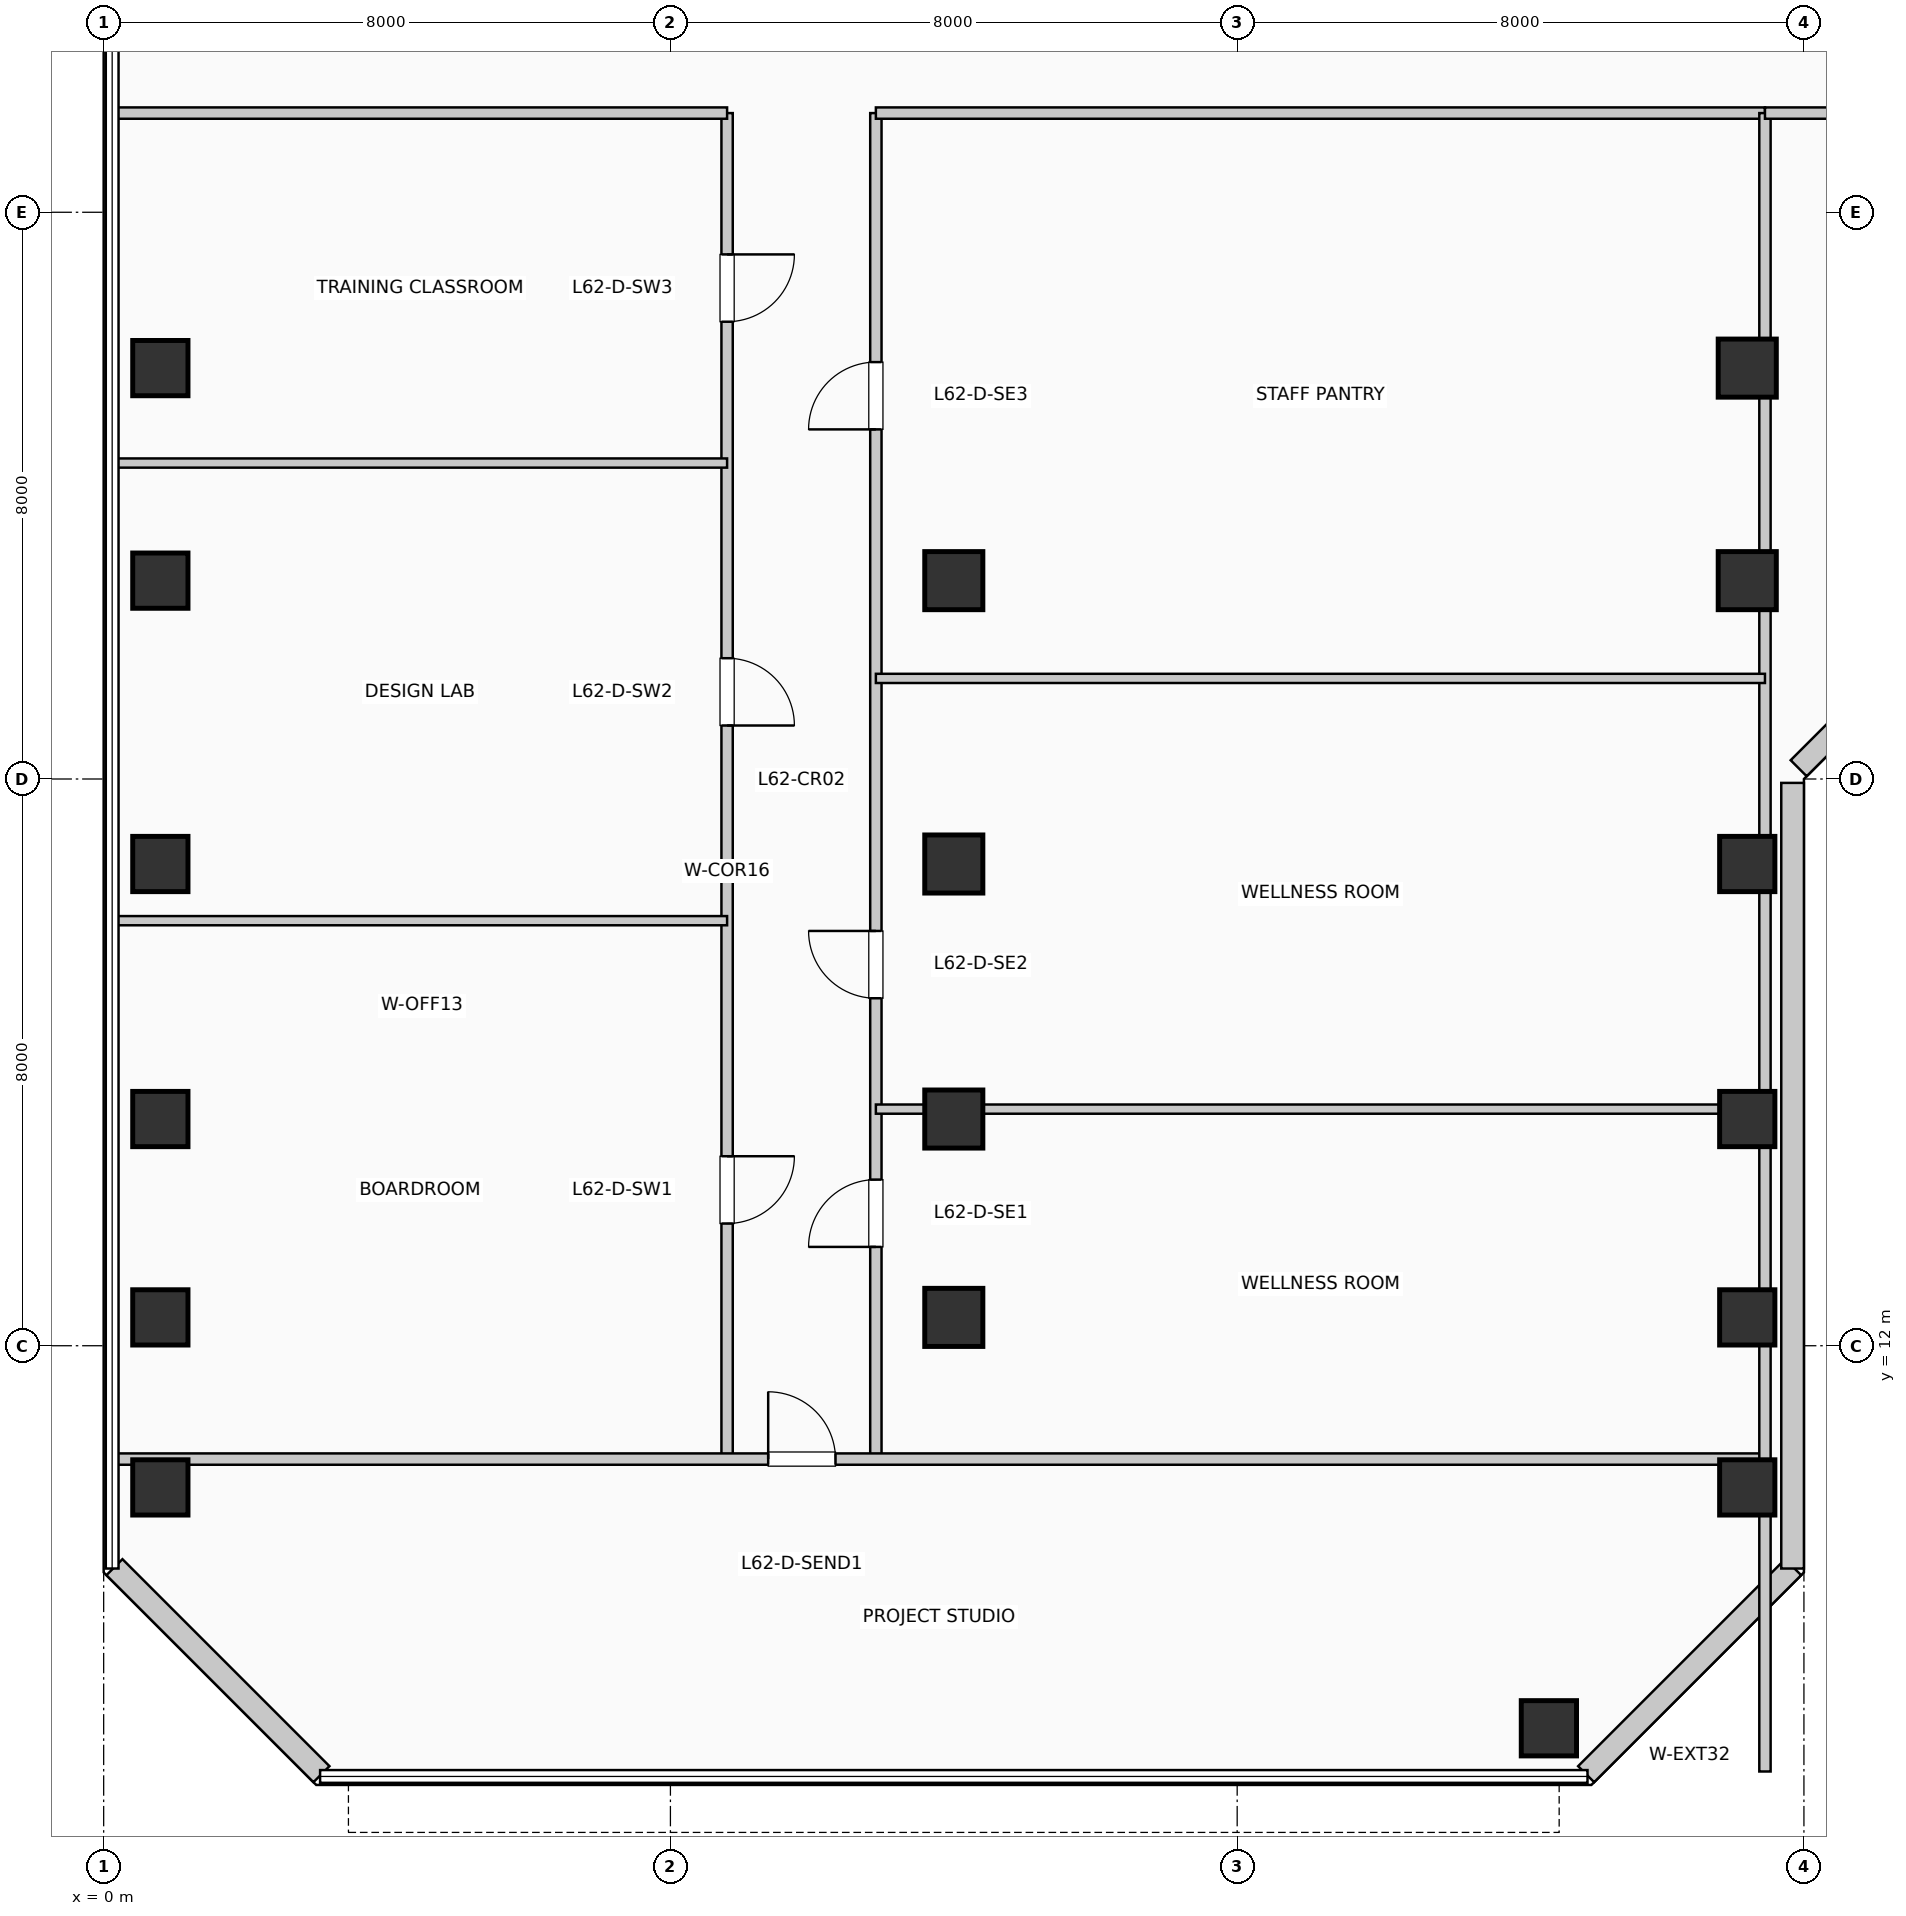
"""IFC4 building model, lengths in metres.
Left out: names, types, materials, properties, quantities, classifications, styles, units other than length and angle.
Written with IfcOpenShell. Run it as: python <this file> out.ifc"""

import sys

from ifc_helpers import new_model, si_unit, direction, frame, frame_2d, origin, origin_2d, place, context, subcontext, project, spatial, rectangle, extrude, element, fill, save


model = new_model("IFC4")
c1 = context("Model", 3, precision=1e-05, world=origin(), true_north=direction((0.0, 1.0)))
c2 = subcontext(c1, "Body", "Model", "MODEL_VIEW")
j1 = project(units=[si_unit("LENGTHUNIT", "METRE"), si_unit("PLANEANGLEUNIT", "RADIAN")], contexts=[c1])
p1 = place(None, origin())
s1 = spatial("IfcSite", under=j1, at=p1, CompositionType="ELEMENT")
p2 = place(p1, origin())
s2 = spatial("IfcBuilding", under=s1, at=p2, CompositionType="ELEMENT")
p3 = place(p2, frame((0.0, 0.0, 256.41)))
s3 = spatial("IfcBuildingStorey", under=s2, at=p3, CompositionType="ELEMENT", Elevation=256.41)
for number, where, z_axis, x_axis in (
    (1, (0.8, 10.0, 0.0), (0.0, 0.0, 1.0), (1.0, 0.0, 0.0)),
    (2, (0.8, 12.4, 0.0), (0.0, 0.0, 1.0), (1.0, 0.0, 0.0)),
    (3, (0.8, 15.2, 0.0), (0.0, 0.0, 1.0), (1.0, 0.0, 0.0)),
    (4, (0.8, 18.8, 0.0), (0.0, 0.0, 1.0), (1.0, 0.0, 0.0)),
    (5, (0.8, 22.8, 0.0), (0.0, 0.0, 1.0), (1.0, 0.0, 0.0)),
    (6, (0.8, 25.8, 0.0), (0.0, 0.0, 1.0), (1.0, 0.0, 0.0)),
):
    element("IfcColumn", number, at=place(p3, frame(where, z_axis=z_axis, x_axis=x_axis)), inside=s3, PredefinedType="COLUMN", context=c2, shape_type="SweptSolid", body=[
        extrude(rectangle(XDim=0.78, YDim=0.78, at=origin_2d()), origin(), (0.0, 0.0, 1.0), 3.96),
    ])
for number, where, z_axis, x_axis in (
    (7, (12.0, 12.4, 0.0), (0.0, 0.0, 1.0), (1.0, 0.0, 0.0)),
    (8, (12.0, 15.2, 0.0), (0.0, 0.0, 1.0), (1.0, 0.0, 0.0)),
    (9, (12.0, 18.8, 0.0), (0.0, 0.0, 1.0), (1.0, 0.0, 0.0)),
    (10, (12.0, 22.8, 0.0), (0.0, 0.0, 1.0), (1.0, 0.0, 0.0)),
):
    element("IfcColumn", number, at=place(p3, frame(where, z_axis=z_axis, x_axis=x_axis)), inside=s3, PredefinedType="COLUMN", context=c2, shape_type="SweptSolid", body=[
        extrude(rectangle(XDim=0.82, YDim=0.82, at=origin_2d()), origin(), (0.0, 0.0, 1.0), 3.96),
    ])
for number, where, z_axis, x_axis in (
    (11, (20.4, 6.6, 0.0), (0.0, 0.0, 1.0), (1.0, 0.0, 0.0)),
    (12, (23.2, 10.0, 0.0), (0.0, 0.0, 1.0), (1.0, 0.0, 0.0)),
    (13, (23.2, 12.4, 0.0), (0.0, 0.0, 1.0), (1.0, 0.0, 0.0)),
    (14, (23.2, 15.2, 0.0), (0.0, 0.0, 1.0), (1.0, 0.0, 0.0)),
    (15, (23.2, 18.8, 0.0), (0.0, 0.0, 1.0), (1.0, 0.0, 0.0)),
):
    element("IfcColumn", number, at=place(p3, frame(where, z_axis=z_axis, x_axis=x_axis)), inside=s3, PredefinedType="COLUMN", context=c2, shape_type="SweptSolid", body=[
        extrude(rectangle(XDim=0.78, YDim=0.78, at=origin_2d()), origin(), (0.0, 0.0, 1.0), 3.96),
    ])
for number, where, z_axis, x_axis in (
    (16, (23.2, 22.8, 0.0), (0.0, 0.0, 1.0), (1.0, 0.0, 0.0)),
    (17, (23.2, 25.8, 0.0), (0.0, 0.0, 1.0), (1.0, 0.0, 0.0)),
):
    element("IfcColumn", number, at=place(p3, frame(where, z_axis=z_axis, x_axis=x_axis)), inside=s3, PredefinedType="COLUMN", context=c2, shape_type="SweptSolid", body=[
        extrude(rectangle(XDim=0.82, YDim=0.82, at=origin_2d()), origin(), (0.0, 0.0, 1.0), 3.96),
    ])
p4 = place(p3, frame((20.926, 5.952, 0.0), z_axis=(0.0, 0.0, 1.0), x_axis=(0.707077242712, 0.707136318428, 0.0)))
e18 = element("IfcWall", 18, at=p4, inside=s3, PredefinedType="SOLIDWALL", context=c2, shape_type="SweptSolid", body=[
    extrude(rectangle(XDim=4.133, YDim=0.32, at=frame_2d((2.066, 0.0))), origin(), (0.0, 0.0, 1.0), 3.71),
])
p5 = place(p3, frame((23.84, 8.855, 0.0), z_axis=(0.0, 0.0, 1.0), x_axis=(0.0, 1.0, 0.0)))
e19 = element("IfcWall", 19, at=p5, inside=s3, PredefinedType="SOLIDWALL", context=c2, shape_type="SweptSolid", body=[
    extrude(rectangle(XDim=11.09, YDim=0.32, at=frame_2d((5.545, 0.0))), origin(), (0.0, 0.0, 1.0), 3.71),
])
p6 = place(p3, frame((23.926, 20.152, 0.0), z_axis=(0.0, 0.0, 1.0), x_axis=(0.707106781187, 0.707106781187, 0.0)))
e20 = element("IfcWall", 20, at=p6, inside=s3, PredefinedType="SOLIDWALL", context=c2, shape_type="SweptSolid", body=[
    extrude(rectangle(XDim=2.718, YDim=0.32, at=frame_2d((1.359, 0.0))), origin(), (0.0, 0.0, 1.0), 3.71),
])
p7 = place(p3, frame((0.152, 8.874, 0.0), z_axis=(0.0, 0.0, 1.0), x_axis=(0.707077242712, -0.707136318428, 0.0)))
e21 = element("IfcWall", 21, at=p7, inside=s3, PredefinedType="SOLIDWALL", context=c2, shape_type="SweptSolid", body=[
    extrude(rectangle(XDim=4.133, YDim=0.32, at=frame_2d((2.066, 0.0))), origin(), (0.0, 0.0, 1.0), 3.71),
])
p8 = place(p3, frame((8.8, 10.4, 0.0), z_axis=(0.0, 0.0, 1.0), x_axis=(0.0, 1.0, 0.0)))
e22 = element("IfcWall", 22, at=p8, inside=s3, PredefinedType="PARTITIONING", context=c2, shape_type="SweptSolid", body=[
    extrude(rectangle(XDim=19.0, YDim=0.16, at=frame_2d((9.5, 0.0))), origin(), (0.0, 0.0, 1.0), 3.71),
])
p9 = place(p8, frame((4.275, 0.0, 0.0), z_axis=(0.0, 0.0, 1.0), x_axis=(-1.0, 0.0, 0.0)))
e23 = element("IfcOpeningElement", 23, at=p9, cuts=e22, PredefinedType="OPENING", context=c2, shape_type="SweptSolid", body=[
    extrude(rectangle(XDim=0.95, YDim=2.15, at=frame_2d((0.475, 1.075))), frame((0.0, 0.09, 0.0), z_axis=(0.0, -1.0, 0.0), x_axis=(1.0, 0.0, 0.0)), (0.0, 0.0, 1.0), 0.18),
])
p10 = place(p8, frame((11.305, 0.0, 0.0), z_axis=(0.0, 0.0, 1.0), x_axis=(-1.0, 0.0, 0.0)))
e24 = element("IfcOpeningElement", 24, at=p10, cuts=e22, PredefinedType="OPENING", context=c2, shape_type="SweptSolid", body=[
    extrude(rectangle(XDim=0.95, YDim=2.15, at=frame_2d((0.475, 1.075))), frame((0.0, 0.09, 0.0), z_axis=(0.0, -1.0, 0.0), x_axis=(1.0, 0.0, 0.0)), (0.0, 0.0, 1.0), 0.18),
])
p11 = place(p8, frame((17.005, 0.0, 0.0), z_axis=(0.0, 0.0, 1.0), x_axis=(-1.0, 0.0, 0.0)))
e25 = element("IfcOpeningElement", 25, at=p11, cuts=e22, PredefinedType="OPENING", context=c2, shape_type="SweptSolid", body=[
    extrude(rectangle(XDim=0.95, YDim=2.15, at=frame_2d((0.475, 1.075))), frame((0.0, 0.09, 0.0), z_axis=(0.0, -1.0, 0.0), x_axis=(1.0, 0.0, 0.0)), (0.0, 0.0, 1.0), 0.18),
])
p12 = place(p3, frame((10.9, 10.4, 0.0), z_axis=(0.0, 0.0, 1.0), x_axis=(0.0, 1.0, 0.0)))
e26 = element("IfcWall", 26, at=p12, inside=s3, PredefinedType="PARTITIONING", context=c2, shape_type="SweptSolid", body=[
    extrude(rectangle(XDim=19.0, YDim=0.16, at=frame_2d((9.5, 0.0))), origin(), (0.0, 0.0, 1.0), 3.71),
])
p13 = place(p12, frame((2.995, 0.0, 0.0)))
e27 = element("IfcOpeningElement", 27, at=p13, cuts=e26, PredefinedType="OPENING", context=c2, shape_type="SweptSolid", body=[
    extrude(rectangle(XDim=0.95, YDim=2.15, at=frame_2d((0.475, 1.075))), frame((0.0, 0.09, 0.0), z_axis=(0.0, -1.0, 0.0), x_axis=(1.0, 0.0, 0.0)), (0.0, 0.0, 1.0), 0.18),
])
p14 = place(p12, frame((6.505, 0.0, 0.0)))
e28 = element("IfcOpeningElement", 28, at=p14, cuts=e26, PredefinedType="OPENING", context=c2, shape_type="SweptSolid", body=[
    extrude(rectangle(XDim=0.95, YDim=2.15, at=frame_2d((0.475, 1.075))), frame((0.0, 0.09, 0.0), z_axis=(0.0, -1.0, 0.0), x_axis=(1.0, 0.0, 0.0)), (0.0, 0.0, 1.0), 0.18),
])
p15 = place(p12, frame((14.535, 0.0, 0.0)))
e29 = element("IfcOpeningElement", 29, at=p15, cuts=e26, PredefinedType="OPENING", context=c2, shape_type="SweptSolid", body=[
    extrude(rectangle(XDim=0.95, YDim=2.15, at=frame_2d((0.475, 1.075))), frame((0.0, 0.09, 0.0), z_axis=(0.0, -1.0, 0.0), x_axis=(1.0, 0.0, 0.0)), (0.0, 0.0, 1.0), 0.18),
])
p16 = place(p3, frame((0.19, 10.4, 0.0), z_axis=(0.0, 0.0, 1.0), x_axis=(1.0, 0.0, 0.0)))
e30 = element("IfcWall", 30, at=p16, inside=s3, PredefinedType="PARTITIONING", context=c2, shape_type="SweptSolid", body=[
    extrude(rectangle(XDim=23.26, YDim=0.16, at=frame_2d((11.63, 0.0))), origin(), (0.0, 0.0, 1.0), 3.095),
])
p17 = place(p16, frame((9.19, 0.0, 0.0)))
e31 = element("IfcOpeningElement", 31, at=p17, cuts=e30, PredefinedType="OPENING", context=c2, shape_type="SweptSolid", body=[
    extrude(rectangle(XDim=0.95, YDim=2.15, at=frame_2d((0.475, 1.075))), frame((0.0, 0.09, 0.0), z_axis=(0.0, -1.0, 0.0), x_axis=(1.0, 0.0, 0.0)), (0.0, 0.0, 1.0), 0.18),
])
p18 = place(p3, frame((0.19, 29.4, 0.0), z_axis=(0.0, 0.0, 1.0), x_axis=(1.0, 0.0, 0.0)))
e32 = element("IfcWall", 32, at=p18, inside=s3, PredefinedType="PARTITIONING", context=c2, shape_type="SweptSolid", body=[
    extrude(rectangle(XDim=8.61, YDim=0.16, at=frame_2d((4.305, 0.0))), origin(), (0.0, 0.0, 1.0), 3.365),
])
p19 = place(p3, frame((10.9, 29.4, 0.0), z_axis=(0.0, 0.0, 1.0), x_axis=(1.0, 0.0, 0.0)))
e33 = element("IfcWall", 33, at=p19, inside=s3, PredefinedType="PARTITIONING", context=c2, shape_type="SweptSolid", body=[
    extrude(rectangle(XDim=12.55, YDim=0.16, at=frame_2d((6.275, 0.0))), origin(), (0.0, 0.0, 1.0), 3.365),
])
p20 = place(p3, frame((23.45, 5.99, 0.0), z_axis=(0.0, 0.0, 1.0), x_axis=(0.0, 1.0, 0.0)))
e34 = element("IfcWall", 34, at=p20, inside=s3, PredefinedType="PARTITIONING", context=c2, shape_type="SweptSolid", body=[
    extrude(rectangle(XDim=23.41, YDim=0.16, at=frame_2d((11.705, 0.0))), origin(), (0.0, 0.0, 1.0), 3.095),
])
for number, where, z_axis, x_axis in (
    (35, (0.19, 18.0, 0.0), (0.0, 0.0, 1.0), (1.0, 0.0, 0.0)),
    (36, (0.19, 24.46, 0.0), (0.0, 0.0, 1.0), (1.0, 0.0, 0.0)),
):
    element("IfcWall", number, at=place(p3, frame(where, z_axis=z_axis, x_axis=x_axis)), inside=s3, PredefinedType="PARTITIONING", context=c2, shape_type="SweptSolid", body=[
        extrude(rectangle(XDim=8.61, YDim=0.13, at=frame_2d((4.305, 0.0))), origin(), (0.0, 0.0, 1.0), 3.71),
    ])
p21 = place(p3, frame((10.9, 15.34, 0.0), z_axis=(0.0, 0.0, 1.0), x_axis=(1.0, 0.0, 0.0)))
e37 = element("IfcWall", 37, at=p21, inside=s3, PredefinedType="PARTITIONING", context=c2, shape_type="SweptSolid", body=[
    extrude(rectangle(XDim=12.55, YDim=0.13, at=frame_2d((6.275, 0.0))), origin(), (0.0, 0.0, 1.0), 3.095),
])
p22 = place(p3, frame((10.9, 21.42, 0.0), z_axis=(0.0, 0.0, 1.0), x_axis=(1.0, 0.0, 0.0)))
e38 = element("IfcWall", 38, at=p22, inside=s3, PredefinedType="PARTITIONING", context=c2, shape_type="SweptSolid", body=[
    extrude(rectangle(XDim=12.55, YDim=0.13, at=frame_2d((6.275, 0.0))), origin(), (0.0, 0.0, 1.0), 3.71),
])
p23 = place(p3, frame((23.45, 29.4, 0.0), z_axis=(0.0, 0.0, 1.0), x_axis=(1.0, 0.0, 0.0)))
e39 = element("IfcWall", 39, at=p23, inside=s3, PredefinedType="PARTITIONING", context=c2, shape_type="SweptSolid", body=[
    extrude(rectangle(XDim=26.56, YDim=0.16, at=frame_2d((13.28, 0.0))), origin(), (0.0, 0.0, 1.0), 3.365),
])
p24 = place(p23, frame((3.928, 0.0, 0.0), z_axis=(0.0, 0.0, 1.0), x_axis=(-1.0, 0.0, 0.0)))
e40 = element("IfcOpeningElement", 40, at=p24, cuts=e39, PredefinedType="OPENING", context=c2, shape_type="SweptSolid", body=[
    extrude(rectangle(XDim=0.95, YDim=2.15, at=frame_2d((0.475, 1.075))), frame((0.0, 0.09, 0.0), z_axis=(0.0, -1.0, 0.0), x_axis=(1.0, 0.0, 0.0)), (0.0, 0.0, 1.0), 0.18),
])
p25 = place(p23, frame((11.099, 0.0, 0.0), z_axis=(0.0, 0.0, 1.0), x_axis=(-1.0, 0.0, 0.0)))
e41 = element("IfcOpeningElement", 41, at=p25, cuts=e39, PredefinedType="OPENING", context=c2, shape_type="SweptSolid", body=[
    extrude(rectangle(XDim=0.95, YDim=2.15, at=frame_2d((0.475, 1.075))), frame((0.0, 0.09, 0.0), z_axis=(0.0, -1.0, 0.0), x_axis=(1.0, 0.0, 0.0)), (0.0, 0.0, 1.0), 0.18),
])
p26 = place(p23, frame((18.27, 0.0, 0.0), z_axis=(0.0, 0.0, 1.0), x_axis=(-1.0, 0.0, 0.0)))
e42 = element("IfcOpeningElement", 42, at=p26, cuts=e39, PredefinedType="OPENING", context=c2, shape_type="SweptSolid", body=[
    extrude(rectangle(XDim=0.95, YDim=2.15, at=frame_2d((0.475, 1.075))), frame((0.0, 0.09, 0.0), z_axis=(0.0, -1.0, 0.0), x_axis=(1.0, 0.0, 0.0)), (0.0, 0.0, 1.0), 0.18),
])
p27 = place(p23, frame((24.379, 0.0, 0.0), z_axis=(0.0, 0.0, 1.0), x_axis=(-1.0, 0.0, 0.0)))
e43 = element("IfcOpeningElement", 43, at=p27, cuts=e39, PredefinedType="OPENING", context=c2, shape_type="SweptSolid", body=[
    extrude(rectangle(XDim=0.95, YDim=2.15, at=frame_2d((0.475, 1.075))), frame((0.0, 0.09, 0.0), z_axis=(0.0, -1.0, 0.0), x_axis=(1.0, 0.0, 0.0)), (0.0, 0.0, 1.0), 0.18),
])
p28 = place(p17, origin())
e44 = element("IfcDoor", 44, at=p28, inside=s3, OperationType="SINGLE_SWING_LEFT", PredefinedType="DOOR", context=c2, shape_type="SweptSolid", body=[
    extrude(rectangle(XDim=0.95, YDim=2.15, at=frame_2d((0.475, 1.075))), frame((0.0, 0.025, 0.0), z_axis=(0.0, -1.0, 0.0), x_axis=(1.0, 0.0, 0.0)), (0.0, 0.0, 1.0), 0.05),
])
fill(e31, e44)
p29 = place(p9, origin())
e45 = element("IfcDoor", 45, at=p29, inside=s3, OperationType="SINGLE_SWING_RIGHT", PredefinedType="DOOR", context=c2, shape_type="SweptSolid", body=[
    extrude(rectangle(XDim=0.95, YDim=2.15, at=frame_2d((0.475, 1.075))), frame((0.0, 0.025, 0.0), z_axis=(0.0, -1.0, 0.0), x_axis=(1.0, 0.0, 0.0)), (0.0, 0.0, 1.0), 0.05),
])
fill(e23, e45)
p30 = place(p10, origin())
e46 = element("IfcDoor", 46, at=p30, inside=s3, OperationType="SINGLE_SWING_LEFT", PredefinedType="DOOR", context=c2, shape_type="SweptSolid", body=[
    extrude(rectangle(XDim=0.95, YDim=2.15, at=frame_2d((0.475, 1.075))), frame((0.0, 0.025, 0.0), z_axis=(0.0, -1.0, 0.0), x_axis=(1.0, 0.0, 0.0)), (0.0, 0.0, 1.0), 0.05),
])
fill(e24, e46)
p31 = place(p11, origin())
e47 = element("IfcDoor", 47, at=p31, inside=s3, OperationType="SINGLE_SWING_RIGHT", PredefinedType="DOOR", context=c2, shape_type="SweptSolid", body=[
    extrude(rectangle(XDim=0.95, YDim=2.15, at=frame_2d((0.475, 1.075))), frame((0.0, 0.025, 0.0), z_axis=(0.0, -1.0, 0.0), x_axis=(1.0, 0.0, 0.0)), (0.0, 0.0, 1.0), 0.05),
])
fill(e25, e47)
p32 = place(p13, origin())
e48 = element("IfcDoor", 48, at=p32, inside=s3, OperationType="SINGLE_SWING_LEFT", PredefinedType="DOOR", context=c2, shape_type="SweptSolid", body=[
    extrude(rectangle(XDim=0.95, YDim=2.15, at=frame_2d((0.475, 1.075))), frame((0.0, 0.025, 0.0), z_axis=(0.0, -1.0, 0.0), x_axis=(1.0, 0.0, 0.0)), (0.0, 0.0, 1.0), 0.05),
])
fill(e27, e48)
p33 = place(p14, origin())
e49 = element("IfcDoor", 49, at=p33, inside=s3, OperationType="SINGLE_SWING_RIGHT", PredefinedType="DOOR", context=c2, shape_type="SweptSolid", body=[
    extrude(rectangle(XDim=0.95, YDim=2.15, at=frame_2d((0.475, 1.075))), frame((0.0, 0.025, 0.0), z_axis=(0.0, -1.0, 0.0), x_axis=(1.0, 0.0, 0.0)), (0.0, 0.0, 1.0), 0.05),
])
fill(e28, e49)
p34 = place(p15, origin())
e50 = element("IfcDoor", 50, at=p34, inside=s3, OperationType="SINGLE_SWING_LEFT", PredefinedType="DOOR", context=c2, shape_type="SweptSolid", body=[
    extrude(rectangle(XDim=0.95, YDim=2.15, at=frame_2d((0.475, 1.075))), frame((0.0, 0.025, 0.0), z_axis=(0.0, -1.0, 0.0), x_axis=(1.0, 0.0, 0.0)), (0.0, 0.0, 1.0), 0.05),
])
fill(e29, e50)
save(model, sys.argv[1])
